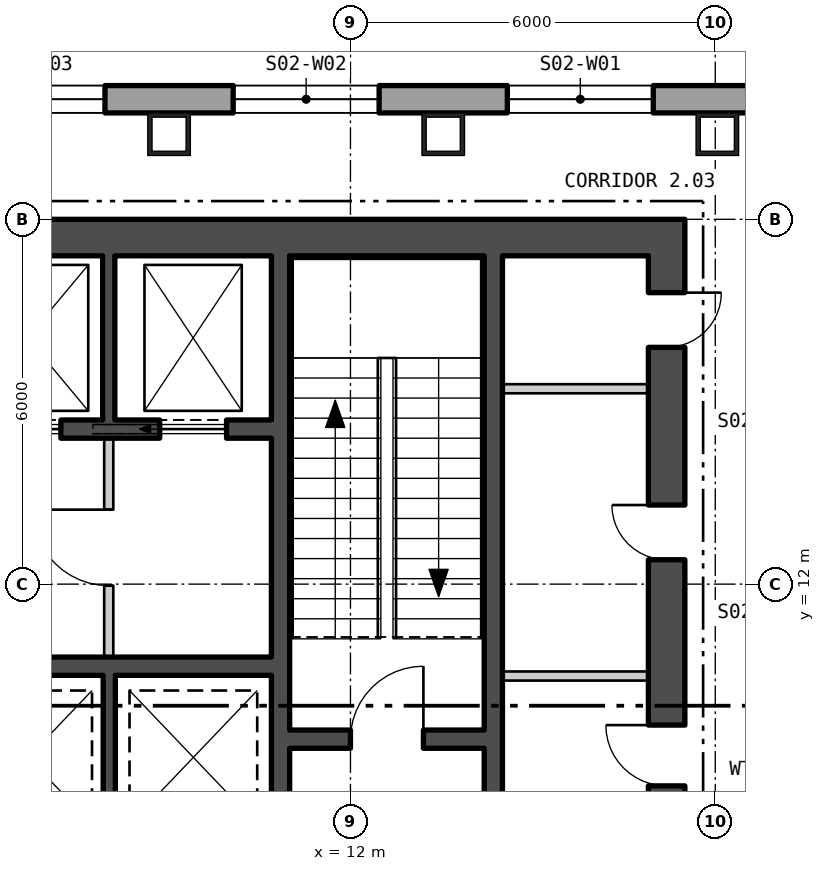
"""IFC4 building model, lengths in metres.
Left out: names, types, materials, properties, quantities, classifications, styles, units other than length and angle.
Written with IfcOpenShell. Run it as: python <this file> out.ifc"""

import sys

from ifc_helpers import new_model, si_unit, direction, frame, frame_2d, origin, origin_2d, place, context, subcontext, project, spatial, polyline, rectangle, hollow_rectangle, outline, extrude, element, fill, save


model = new_model("IFC4")
c1 = context("Model", 3, precision=1e-05, world=origin(), true_north=direction((0.0, 1.0)))
c2 = subcontext(c1, "Body", "Model", "MODEL_VIEW")
j1 = project(units=[si_unit("LENGTHUNIT", "METRE"), si_unit("PLANEANGLEUNIT", "RADIAN")], contexts=[c1])
p1 = place(None, origin())
s1 = spatial("IfcSite", under=j1, at=p1, CompositionType="ELEMENT")
p2 = place(p1, origin())
s2 = spatial("IfcBuilding", under=s1, at=p2, CompositionType="ELEMENT")
p3 = place(p2, frame((0.0, 0.0, 33.3)))
s3 = spatial("IfcBuildingStorey", under=s2, at=p3, CompositionType="ELEMENT", Elevation=33.3)
for number, where, z_axis, x_axis in (
    (1, (18.034, 19.4, 0.0), (0.0, 0.0, 1.0), (-1.0, 0.0, 0.0)),
    (2, (13.526, 19.4, 0.0), (0.0, 0.0, 1.0), (-1.0, 0.0, 0.0)),
    (3, (9.017, 19.4, 0.0), (0.0, 0.0, 1.0), (-1.0, 0.0, 0.0)),
):
    element("IfcColumn", number, at=place(p3, frame(where, z_axis=z_axis, x_axis=x_axis)), inside=s3, PredefinedType="COLUMN", context=c2, shape_type="SweptSolid", body=[
        extrude(hollow_rectangle(XDim=0.7, YDim=0.7, WallThickness=0.07, at=origin_2d()), origin(), (0.0, 0.0, 1.0), 4.5),
    ])
p4 = place(p3, frame((22.875, 19.975, -0.4), z_axis=(0.0, 0.0, 1.0), x_axis=(-1.0, 0.0, 0.0)))
e4 = element("IfcWall", 4, at=p4, inside=s3, PredefinedType="SOLIDWALL", context=c2, shape_type="SweptSolid", body=[
    extrude(outline(polyline([(-0.13, -0.225), (45.88, -0.225), (45.62, 0.225), (0.13, 0.225), (-0.13, -0.225)])), origin(), (0.0, 0.0, 1.0), 4.5),
])
p5 = place(p4, frame((5.895, 0.0, 1.3)))
e5 = element("IfcOpeningElement", 5, at=p5, cuts=e4, PredefinedType="OPENING", context=c2, shape_type="SweptSolid", body=[
    extrude(rectangle(XDim=2.4, YDim=2.6, at=frame_2d((1.2, 1.3))), frame((0.0, 0.235, 0.0), z_axis=(0.0, -1.0, 0.0), x_axis=(1.0, 0.0, 0.0)), (0.0, 0.0, 1.0), 0.47),
])
p6 = place(p4, frame((10.403, 0.0, 1.3)))
e6 = element("IfcOpeningElement", 6, at=p6, cuts=e4, PredefinedType="OPENING", context=c2, shape_type="SweptSolid", body=[
    extrude(rectangle(XDim=2.4, YDim=2.6, at=frame_2d((1.2, 1.3))), frame((0.0, 0.235, 0.0), z_axis=(0.0, -1.0, 0.0), x_axis=(1.0, 0.0, 0.0)), (0.0, 0.0, 1.0), 0.47),
])
p7 = place(p4, frame((14.912, 0.0, 1.3)))
e7 = element("IfcOpeningElement", 7, at=p7, cuts=e4, PredefinedType="OPENING", context=c2, shape_type="SweptSolid", body=[
    extrude(rectangle(XDim=2.4, YDim=2.6, at=frame_2d((1.2, 1.3))), frame((0.0, 0.235, 0.0), z_axis=(0.0, -1.0, 0.0), x_axis=(1.0, 0.0, 0.0)), (0.0, 0.0, 1.0), 0.47),
])
p8 = place(p4, frame((19.421, 0.0, 1.3)))
e8 = element("IfcOpeningElement", 8, at=p8, cuts=e4, PredefinedType="OPENING", context=c2, shape_type="SweptSolid", body=[
    extrude(rectangle(XDim=2.4, YDim=2.6, at=frame_2d((1.2, 1.3))), frame((0.0, 0.235, 0.0), z_axis=(0.0, -1.0, 0.0), x_axis=(1.0, 0.0, 0.0)), (0.0, 0.0, 1.0), 0.47),
])
p9 = place(p4, frame((23.929, 0.0, 1.3)))
e9 = element("IfcOpeningElement", 9, at=p9, cuts=e4, PredefinedType="OPENING", context=c2, shape_type="SweptSolid", body=[
    extrude(rectangle(XDim=2.4, YDim=2.6, at=frame_2d((1.2, 1.3))), frame((0.0, 0.235, 0.0), z_axis=(0.0, -1.0, 0.0), x_axis=(1.0, 0.0, 0.0)), (0.0, 0.0, 1.0), 0.47),
])
p10 = place(p4, frame((28.438, 0.0, 1.3)))
e10 = element("IfcOpeningElement", 10, at=p10, cuts=e4, PredefinedType="OPENING", context=c2, shape_type="SweptSolid", body=[
    extrude(rectangle(XDim=2.4, YDim=2.6, at=frame_2d((1.2, 1.3))), frame((0.0, 0.235, 0.0), z_axis=(0.0, -1.0, 0.0), x_axis=(1.0, 0.0, 0.0)), (0.0, 0.0, 1.0), 0.47),
])
p11 = place(p4, frame((32.947, 0.0, 1.3)))
e11 = element("IfcOpeningElement", 11, at=p11, cuts=e4, PredefinedType="OPENING", context=c2, shape_type="SweptSolid", body=[
    extrude(rectangle(XDim=2.4, YDim=2.6, at=frame_2d((1.2, 1.3))), frame((0.0, 0.235, 0.0), z_axis=(0.0, -1.0, 0.0), x_axis=(1.0, 0.0, 0.0)), (0.0, 0.0, 1.0), 0.47),
])
p12 = place(p4, frame((37.455, 0.0, 1.3)))
e12 = element("IfcOpeningElement", 12, at=p12, cuts=e4, PredefinedType="OPENING", context=c2, shape_type="SweptSolid", body=[
    extrude(rectangle(XDim=2.4, YDim=2.6, at=frame_2d((1.2, 1.3))), frame((0.0, 0.235, 0.0), z_axis=(0.0, -1.0, 0.0), x_axis=(1.0, 0.0, 0.0)), (0.0, 0.0, 1.0), 0.47),
])
p13 = place(p3, frame((5.75, -29.605, -0.18), z_axis=(0.0, 0.0, 1.0), x_axis=(0.500000335318, 0.866025210188, 0.0)))
e13 = element("IfcWall", 13, at=p13, inside=s3, PredefinedType="SOLIDWALL", context=c2, shape_type="SweptSolid", body=[
    extrude(outline(polyline([(-0.13, -0.225), (45.88, -0.225), (45.62, 0.225), (0.13, 0.225), (-0.13, -0.225)])), origin(), (0.0, 0.0, 1.0), 4.28),
])
p14 = place(p13, frame((1.425, 0.0, 1.08)))
e14 = element("IfcOpeningElement", 14, at=p14, cuts=e13, PredefinedType="OPENING", context=c2, shape_type="SweptSolid", body=[
    extrude(rectangle(XDim=2.4, YDim=2.6, at=frame_2d((1.2, 1.3))), frame((0.0, 0.235, 0.0), z_axis=(0.0, -1.0, 0.0), x_axis=(1.0, 0.0, 0.0)), (0.0, 0.0, 1.0), 0.47),
])
p15 = place(p13, frame((5.895, 0.0, 1.08)))
e15 = element("IfcOpeningElement", 15, at=p15, cuts=e13, PredefinedType="OPENING", context=c2, shape_type="SweptSolid", body=[
    extrude(rectangle(XDim=2.4, YDim=2.6, at=frame_2d((1.2, 1.3))), frame((0.0, 0.235, 0.0), z_axis=(0.0, -1.0, 0.0), x_axis=(1.0, 0.0, 0.0)), (0.0, 0.0, 1.0), 0.47),
])
p16 = place(p13, frame((10.403, 0.0, 1.08)))
e16 = element("IfcOpeningElement", 16, at=p16, cuts=e13, PredefinedType="OPENING", context=c2, shape_type="SweptSolid", body=[
    extrude(rectangle(XDim=2.4, YDim=2.6, at=frame_2d((1.2, 1.3))), frame((0.0, 0.235, 0.0), z_axis=(0.0, -1.0, 0.0), x_axis=(1.0, 0.0, 0.0)), (0.0, 0.0, 1.0), 0.47),
])
p17 = place(p13, frame((14.912, 0.0, 1.08)))
e17 = element("IfcOpeningElement", 17, at=p17, cuts=e13, PredefinedType="OPENING", context=c2, shape_type="SweptSolid", body=[
    extrude(rectangle(XDim=2.4, YDim=2.6, at=frame_2d((1.2, 1.3))), frame((0.0, 0.235, 0.0), z_axis=(0.0, -1.0, 0.0), x_axis=(1.0, 0.0, 0.0)), (0.0, 0.0, 1.0), 0.47),
])
p18 = place(p13, frame((19.421, 0.0, 1.08)))
e18 = element("IfcOpeningElement", 18, at=p18, cuts=e13, PredefinedType="OPENING", context=c2, shape_type="SweptSolid", body=[
    extrude(rectangle(XDim=2.4, YDim=2.6, at=frame_2d((1.2, 1.3))), frame((0.0, 0.235, 0.0), z_axis=(0.0, -1.0, 0.0), x_axis=(1.0, 0.0, 0.0)), (0.0, 0.0, 1.0), 0.47),
])
p19 = place(p13, frame((23.929, 0.0, 1.08)))
e19 = element("IfcOpeningElement", 19, at=p19, cuts=e13, PredefinedType="OPENING", context=c2, shape_type="SweptSolid", body=[
    extrude(rectangle(XDim=2.4, YDim=2.6, at=frame_2d((1.2, 1.3))), frame((0.0, 0.235, 0.0), z_axis=(0.0, -1.0, 0.0), x_axis=(1.0, 0.0, 0.0)), (0.0, 0.0, 1.0), 0.47),
])
p20 = place(p13, frame((28.438, 0.0, 1.08)))
e20 = element("IfcOpeningElement", 20, at=p20, cuts=e13, PredefinedType="OPENING", context=c2, shape_type="SweptSolid", body=[
    extrude(rectangle(XDim=2.4, YDim=2.6, at=frame_2d((1.2, 1.3))), frame((0.0, 0.235, 0.0), z_axis=(0.0, -1.0, 0.0), x_axis=(1.0, 0.0, 0.0)), (0.0, 0.0, 1.0), 0.47),
])
p21 = place(p13, frame((32.947, 0.0, 1.08)))
e21 = element("IfcOpeningElement", 21, at=p21, cuts=e13, PredefinedType="OPENING", context=c2, shape_type="SweptSolid", body=[
    extrude(rectangle(XDim=2.4, YDim=2.6, at=frame_2d((1.2, 1.3))), frame((0.0, 0.235, 0.0), z_axis=(0.0, -1.0, 0.0), x_axis=(1.0, 0.0, 0.0)), (0.0, 0.0, 1.0), 0.47),
])
p22 = place(p13, frame((37.455, 0.0, 1.08)))
e22 = element("IfcOpeningElement", 22, at=p22, cuts=e13, PredefinedType="OPENING", context=c2, shape_type="SweptSolid", body=[
    extrude(rectangle(XDim=2.4, YDim=2.6, at=frame_2d((1.2, 1.3))), frame((0.0, 0.235, 0.0), z_axis=(0.0, -1.0, 0.0), x_axis=(1.0, 0.0, 0.0)), (0.0, 0.0, 1.0), 0.47),
])
p23 = place(p13, frame((41.925, 0.0, 1.08)))
e23 = element("IfcOpeningElement", 23, at=p23, cuts=e13, PredefinedType="OPENING", context=c2, shape_type="SweptSolid", body=[
    extrude(rectangle(XDim=2.4, YDim=2.6, at=frame_2d((1.2, 1.3))), frame((0.0, 0.235, 0.0), z_axis=(0.0, -1.0, 0.0), x_axis=(1.0, 0.0, 0.0)), (0.0, 0.0, 1.0), 0.47),
])
p24 = place(p3, frame((-17.5, 17.7, 0.0), z_axis=(0.0, 0.0, 1.0), x_axis=(1.0, 0.0, 0.0)))
e24 = element("IfcWall", 24, at=p24, inside=s3, PredefinedType="SHEAR", context=c2, shape_type="SweptSolid", body=[
    extrude(rectangle(XDim=35.0, YDim=0.6, at=frame_2d((17.5, 0.0))), origin(), (0.0, 0.0, 1.0), 4.3),
])
p25 = place(p3, frame((17.2, 0.6, 0.0), z_axis=(0.0, 0.0, 1.0), x_axis=(0.0, 1.0, 0.0)))
e25 = element("IfcWall", 25, at=p25, inside=s3, PredefinedType="SHEAR", context=c2, shape_type="SweptSolid", body=[
    extrude(rectangle(XDim=16.8, YDim=0.6, at=frame_2d((8.4, 0.0))), origin(), (0.0, 0.0, 1.0), 4.3),
])
p26 = place(p25, frame((5.7, 0.0, 0.0)))
e26 = element("IfcOpeningElement", 26, at=p26, cuts=e25, PredefinedType="OPENING", context=c2, shape_type="SweptSolid", body=[
    extrude(rectangle(XDim=1.5, YDim=2.1, at=frame_2d((0.75, 1.05))), frame((0.0, 0.31, 0.0), z_axis=(0.0, -1.0, 0.0), x_axis=(1.0, 0.0, 0.0)), (0.0, 0.0, 1.0), 0.62),
])
p27 = place(p25, frame((0.4, 0.0, 0.0)))
e27 = element("IfcOpeningElement", 27, at=p27, cuts=e25, PredefinedType="OPENING", context=c2, shape_type="SweptSolid", body=[
    extrude(rectangle(XDim=0.9, YDim=2.1, at=frame_2d((0.45, 1.05))), frame((0.0, 0.31, 0.0), z_axis=(0.0, -1.0, 0.0), x_axis=(1.0, 0.0, 0.0)), (0.0, 0.0, 1.0), 0.62),
])
p28 = place(p25, frame((3.15, 0.0, 0.0)))
e28 = element("IfcOpeningElement", 28, at=p28, cuts=e25, PredefinedType="OPENING", context=c2, shape_type="SweptSolid", body=[
    extrude(rectangle(XDim=0.9, YDim=2.1, at=frame_2d((0.45, 1.05))), frame((0.0, 0.31, 0.0), z_axis=(0.0, -1.0, 0.0), x_axis=(1.0, 0.0, 0.0)), (0.0, 0.0, 1.0), 0.62),
])
p29 = place(p25, frame((8.082, 0.0, 0.0)))
e29 = element("IfcOpeningElement", 29, at=p29, cuts=e25, PredefinedType="OPENING", context=c2, shape_type="SweptSolid", body=[
    extrude(rectangle(XDim=1.0, YDim=2.1, at=frame_2d((0.5, 1.05))), frame((0.0, 0.31, 0.0), z_axis=(0.0, -1.0, 0.0), x_axis=(1.0, 0.0, 0.0)), (0.0, 0.0, 1.0), 0.62),
])
p30 = place(p25, frame((11.801, 0.0, 0.0)))
e30 = element("IfcOpeningElement", 30, at=p30, cuts=e25, PredefinedType="OPENING", context=c2, shape_type="SweptSolid", body=[
    extrude(rectangle(XDim=0.9, YDim=2.1, at=frame_2d((0.45, 1.05))), frame((0.0, 0.31, 0.0), z_axis=(0.0, -1.0, 0.0), x_axis=(1.0, 0.0, 0.0)), (0.0, 0.0, 1.0), 0.62),
])
p31 = place(p25, frame((15.294, 0.0, 0.0)))
e31 = element("IfcOpeningElement", 31, at=p31, cuts=e25, PredefinedType="OPENING", context=c2, shape_type="SweptSolid", body=[
    extrude(rectangle(XDim=0.9, YDim=2.1, at=frame_2d((0.45, 1.05))), frame((0.0, 0.31, 0.0), z_axis=(0.0, -1.0, 0.0), x_axis=(1.0, 0.0, 0.0)), (0.0, 0.0, 1.0), 0.62),
])
p32 = place(p3, frame((10.85, 0.6, 0.0), z_axis=(0.0, 0.0, 1.0), x_axis=(0.0, 1.0, 0.0)))
e32 = element("IfcWall", 32, at=p32, inside=s3, PredefinedType="SHEAR", context=c2, shape_type="SweptSolid", body=[
    extrude(rectangle(XDim=16.8, YDim=0.3, at=frame_2d((8.4, 0.0))), origin(), (0.0, 0.0, 1.0), 4.3),
])
p33 = place(p32, frame((5.075, 0.0, 0.0)))
e33 = element("IfcOpeningElement", 33, at=p33, cuts=e32, PredefinedType="OPENING", context=c2, shape_type="SweptSolid", body=[
    extrude(rectangle(XDim=1.25, YDim=2.1, at=frame_2d((0.625, 1.05))), frame((0.0, 0.16, 0.0), z_axis=(0.0, -1.0, 0.0), x_axis=(1.0, 0.0, 0.0)), (0.0, 0.0, 1.0), 0.32),
])
p34 = place(p32, frame((1.525, 0.0, 0.0)))
e34 = element("IfcOpeningElement", 34, at=p34, cuts=e32, PredefinedType="OPENING", context=c2, shape_type="SweptSolid", body=[
    extrude(rectangle(XDim=1.0, YDim=2.1, at=frame_2d((0.5, 1.05))), frame((0.0, 0.16, 0.0), z_axis=(0.0, -1.0, 0.0), x_axis=(1.0, 0.0, 0.0)), (0.0, 0.0, 1.0), 0.32),
])
p35 = place(p3, frame((14.35, 0.6, 0.0), z_axis=(0.0, 0.0, 1.0), x_axis=(0.0, 1.0, 0.0)))
e35 = element("IfcWall", 35, at=p35, inside=s3, PredefinedType="SHEAR", context=c2, shape_type="SweptSolid", body=[
    extrude(rectangle(XDim=16.8, YDim=0.3, at=frame_2d((8.4, 0.0))), origin(), (0.0, 0.0, 1.0), 4.3),
])
p36 = place(p35, frame((5.7, 0.0, 0.0)))
e36 = element("IfcOpeningElement", 36, at=p36, cuts=e35, PredefinedType="OPENING", context=c2, shape_type="SweptSolid", body=[
    extrude(rectangle(XDim=1.5, YDim=2.1, at=frame_2d((0.75, 1.05))), frame((0.0, 0.16, 0.0), z_axis=(0.0, -1.0, 0.0), x_axis=(1.0, 0.0, 0.0)), (0.0, 0.0, 1.0), 0.32),
])
p37 = place(p3, frame((11.0, 9.45, 0.0), z_axis=(0.0, 0.0, 1.0), x_axis=(1.0, 0.0, 0.0)))
e37 = element("IfcWall", 37, at=p37, inside=s3, PredefinedType="SHEAR", context=c2, shape_type="SweptSolid", body=[
    extrude(rectangle(XDim=3.2, YDim=0.3, at=frame_2d((1.6, 0.0))), origin(), (0.0, 0.0, 1.0), 4.3),
])
p38 = place(p37, frame((1.0, 0.0, 0.0)))
e38 = element("IfcOpeningElement", 38, at=p38, cuts=e37, PredefinedType="OPENING", context=c2, shape_type="SweptSolid", body=[
    extrude(rectangle(XDim=1.2, YDim=2.1, at=frame_2d((0.6, 1.05))), frame((0.0, 0.16, 0.0), z_axis=(0.0, -1.0, 0.0), x_axis=(1.0, 0.0, 0.0)), (0.0, 0.0, 1.0), 0.32),
])
p39 = place(p3, frame((-10.7, 14.55, 0.0), z_axis=(0.0, 0.0, 1.0), x_axis=(1.0, 0.0, 0.0)))
e39 = element("IfcWall", 39, at=p39, inside=s3, PredefinedType="SHEAR", context=c2, shape_type="SweptSolid", body=[
    extrude(rectangle(XDim=21.4, YDim=0.3, at=frame_2d((10.7, 0.0))), origin(), (0.0, 0.0, 1.0), 4.3),
])
p40 = place(p39, frame((0.738, 0.0, 0.0)))
e40 = element("IfcOpeningElement", 40, at=p40, cuts=e39, PredefinedType="OPENING", context=c2, shape_type="SweptSolid", body=[
    extrude(rectangle(XDim=1.1, YDim=2.1, at=frame_2d((0.55, 1.05))), frame((0.0, 0.16, 0.0), z_axis=(0.0, -1.0, 0.0), x_axis=(1.0, 0.0, 0.0)), (0.0, 0.0, 1.0), 0.32),
])
p41 = place(p39, frame((3.462, 0.0, 0.0)))
e41 = element("IfcOpeningElement", 41, at=p41, cuts=e39, PredefinedType="OPENING", context=c2, shape_type="SweptSolid", body=[
    extrude(rectangle(XDim=1.1, YDim=2.1, at=frame_2d((0.55, 1.05))), frame((0.0, 0.16, 0.0), z_axis=(0.0, -1.0, 0.0), x_axis=(1.0, 0.0, 0.0)), (0.0, 0.0, 1.0), 0.32),
])
p42 = place(p39, frame((6.138, 0.0, 0.0)))
e42 = element("IfcOpeningElement", 42, at=p42, cuts=e39, PredefinedType="OPENING", context=c2, shape_type="SweptSolid", body=[
    extrude(rectangle(XDim=1.1, YDim=2.1, at=frame_2d((0.55, 1.05))), frame((0.0, 0.16, 0.0), z_axis=(0.0, -1.0, 0.0), x_axis=(1.0, 0.0, 0.0)), (0.0, 0.0, 1.0), 0.32),
])
p43 = place(p39, frame((8.812, 0.0, 0.0)))
e43 = element("IfcOpeningElement", 43, at=p43, cuts=e39, PredefinedType="OPENING", context=c2, shape_type="SweptSolid", body=[
    extrude(rectangle(XDim=1.1, YDim=2.1, at=frame_2d((0.55, 1.05))), frame((0.0, 0.16, 0.0), z_axis=(0.0, -1.0, 0.0), x_axis=(1.0, 0.0, 0.0)), (0.0, 0.0, 1.0), 0.32),
])
p44 = place(p39, frame((14.162, 0.0, 0.0)))
e44 = element("IfcOpeningElement", 44, at=p44, cuts=e39, PredefinedType="OPENING", context=c2, shape_type="SweptSolid", body=[
    extrude(rectangle(XDim=1.1, YDim=2.1, at=frame_2d((0.55, 1.05))), frame((0.0, 0.16, 0.0), z_axis=(0.0, -1.0, 0.0), x_axis=(1.0, 0.0, 0.0)), (0.0, 0.0, 1.0), 0.32),
])
p45 = place(p39, frame((16.837, 0.0, 0.0)))
e45 = element("IfcOpeningElement", 45, at=p45, cuts=e39, PredefinedType="OPENING", context=c2, shape_type="SweptSolid", body=[
    extrude(rectangle(XDim=1.1, YDim=2.1, at=frame_2d((0.55, 1.05))), frame((0.0, 0.16, 0.0), z_axis=(0.0, -1.0, 0.0), x_axis=(1.0, 0.0, 0.0)), (0.0, 0.0, 1.0), 0.32),
])
p46 = place(p39, frame((19.562, 0.0, 0.0)))
e46 = element("IfcOpeningElement", 46, at=p46, cuts=e39, PredefinedType="OPENING", context=c2, shape_type="SweptSolid", body=[
    extrude(rectangle(XDim=1.1, YDim=2.1, at=frame_2d((0.55, 1.05))), frame((0.0, 0.16, 0.0), z_axis=(0.0, -1.0, 0.0), x_axis=(1.0, 0.0, 0.0)), (0.0, 0.0, 1.0), 0.32),
])
p47 = place(p3, frame((2.6, 10.65, 0.0), z_axis=(0.0, 0.0, 1.0), x_axis=(1.0, 0.0, 0.0)))
e47 = element("IfcWall", 47, at=p47, inside=s3, PredefinedType="SHEAR", context=c2, shape_type="SweptSolid", body=[
    extrude(rectangle(XDim=8.1, YDim=0.3, at=frame_2d((4.05, 0.0))), origin(), (0.0, 0.0, 1.0), 4.3),
])
for number, where, z_axis, x_axis in (
    (48, (8.025, 14.7, 0.0), (0.0, 0.0, 1.0), (0.0, 1.0, 0.0)),
    (49, (8.033, 7.8, 0.0), (0.0, 0.0, 1.0), (0.0, 1.0, 0.0)),
):
    element("IfcWall", number, at=place(p3, frame(where, z_axis=z_axis, x_axis=x_axis)), inside=s3, PredefinedType="SHEAR", context=c2, shape_type="SweptSolid", body=[
        extrude(rectangle(XDim=2.7, YDim=0.2, at=frame_2d((1.35, 0.0))), origin(), (0.0, 0.0, 1.0), 4.3),
    ])
p48 = place(p3, frame((8.025, 10.8, 0.0), z_axis=(0.0, 0.0, 1.0), x_axis=(0.0, 1.0, 0.0)))
e50 = element("IfcWall", 50, at=p48, inside=s3, PredefinedType="PARTITIONING", context=c2, shape_type="SweptSolid", body=[
    extrude(rectangle(XDim=3.6, YDim=0.15, at=frame_2d((1.8, 0.0))), origin(), (0.0, 0.0, 1.0), 4.3),
])
p49 = place(p48, frame((1.175, 0.0, 0.0)))
e51 = element("IfcOpeningElement", 51, at=p49, cuts=e50, PredefinedType="OPENING", context=c2, shape_type="SweptSolid", body=[
    extrude(rectangle(XDim=1.25, YDim=2.1, at=frame_2d((0.625, 1.05))), frame((0.0, 0.085, 0.0), z_axis=(0.0, -1.0, 0.0), x_axis=(1.0, 0.0, 0.0)), (0.0, 0.0, 1.0), 0.17),
])
for number, where, z_axis, x_axis in (
    (52, (14.5, 10.489, 0.0), (0.0, 0.0, 1.0), (1.0, 0.0, 0.0)),
    (53, (14.5, 15.213, 0.0), (0.0, 0.0, 1.0), (1.0, 0.0, 0.0)),
):
    element("IfcWall", number, at=place(p3, frame(where, z_axis=z_axis, x_axis=x_axis)), inside=s3, PredefinedType="PARTITIONING", context=c2, shape_type="SweptSolid", body=[
        extrude(rectangle(XDim=2.4, YDim=0.15, at=frame_2d((1.2, 0.0))), origin(), (0.0, 0.0, 1.0), 4.3),
    ])
p50 = place(p5, origin())
e54 = element("IfcWindow", 54, at=p50, inside=s3, PartitioningType="SINGLE_PANEL", PredefinedType="WINDOW", context=c2, shape_type="SweptSolid", body=[
    extrude(rectangle(XDim=2.4, YDim=2.6, at=frame_2d((1.2, 1.3))), frame((0.0, 0.105, 0.0), z_axis=(0.0, -1.0, 0.0), x_axis=(1.0, 0.0, 0.0)), (0.0, 0.0, 1.0), 0.06),
])
fill(e5, e54)
p51 = place(p6, origin())
e55 = element("IfcWindow", 55, at=p51, inside=s3, PartitioningType="SINGLE_PANEL", PredefinedType="WINDOW", context=c2, shape_type="SweptSolid", body=[
    extrude(rectangle(XDim=2.4, YDim=2.6, at=frame_2d((1.2, 1.3))), frame((0.0, 0.105, 0.0), z_axis=(0.0, -1.0, 0.0), x_axis=(1.0, 0.0, 0.0)), (0.0, 0.0, 1.0), 0.06),
])
fill(e6, e55)
p52 = place(p7, origin())
e56 = element("IfcWindow", 56, at=p52, inside=s3, PartitioningType="SINGLE_PANEL", PredefinedType="WINDOW", context=c2, shape_type="SweptSolid", body=[
    extrude(rectangle(XDim=2.4, YDim=2.6, at=frame_2d((1.2, 1.3))), frame((0.0, 0.105, 0.0), z_axis=(0.0, -1.0, 0.0), x_axis=(1.0, 0.0, 0.0)), (0.0, 0.0, 1.0), 0.06),
])
fill(e7, e56)
p53 = place(p45, origin())
e57 = element("IfcDoor", 57, at=p53, inside=s3, OperationType="SLIDING_TO_LEFT", PredefinedType="DOOR", context=c2, shape_type="SweptSolid", body=[
    extrude(rectangle(XDim=1.1, YDim=2.1, at=frame_2d((0.55, 1.05))), frame((0.0, 0.025, 0.0), z_axis=(0.0, -1.0, 0.0), x_axis=(1.0, 0.0, 0.0)), (0.0, 0.0, 1.0), 0.05),
])
fill(e45, e57)
p54 = place(p46, origin())
e58 = element("IfcDoor", 58, at=p54, inside=s3, OperationType="SLIDING_TO_LEFT", PredefinedType="DOOR", context=c2, shape_type="SweptSolid", body=[
    extrude(rectangle(XDim=1.1, YDim=2.1, at=frame_2d((0.55, 1.05))), frame((0.0, 0.025, 0.0), z_axis=(0.0, -1.0, 0.0), x_axis=(1.0, 0.0, 0.0)), (0.0, 0.0, 1.0), 0.05),
])
fill(e46, e58)
p55 = place(p49, origin())
e59 = element("IfcDoor", 59, at=p55, inside=s3, OperationType="SINGLE_SWING_LEFT", PredefinedType="DOOR", context=c2, shape_type="SweptSolid", body=[
    extrude(rectangle(XDim=1.25, YDim=2.1, at=frame_2d((0.625, 1.05))), frame((0.0, 0.025, 0.0), z_axis=(0.0, -1.0, 0.0), x_axis=(1.0, 0.0, 0.0)), (0.0, 0.0, 1.0), 0.05),
])
fill(e51, e59)
p56 = place(p38, origin())
e60 = element("IfcDoor", 60, at=p56, inside=s3, OperationType="SINGLE_SWING_LEFT", PredefinedType="DOOR", context=c2, shape_type="SweptSolid", body=[
    extrude(rectangle(XDim=1.2, YDim=2.1, at=frame_2d((0.6, 1.05))), frame((0.0, 0.025, 0.0), z_axis=(0.0, -1.0, 0.0), x_axis=(1.0, 0.0, 0.0)), (0.0, 0.0, 1.0), 0.05),
])
fill(e38, e60)
p57 = place(p29, origin())
e61 = element("IfcDoor", 61, at=p57, inside=s3, OperationType="SINGLE_SWING_LEFT", PredefinedType="DOOR", context=c2, shape_type="SweptSolid", body=[
    extrude(rectangle(XDim=1.0, YDim=2.1, at=frame_2d((0.5, 1.05))), frame((0.0, 0.025, 0.0), z_axis=(0.0, -1.0, 0.0), x_axis=(1.0, 0.0, 0.0)), (0.0, 0.0, 1.0), 0.05),
])
fill(e29, e61)
p58 = place(p30, origin())
e62 = element("IfcDoor", 62, at=p58, inside=s3, OperationType="SINGLE_SWING_LEFT", PredefinedType="DOOR", context=c2, shape_type="SweptSolid", body=[
    extrude(rectangle(XDim=0.9, YDim=2.1, at=frame_2d((0.45, 1.05))), frame((0.0, 0.025, 0.0), z_axis=(0.0, -1.0, 0.0), x_axis=(1.0, 0.0, 0.0)), (0.0, 0.0, 1.0), 0.05),
])
fill(e30, e62)
p59 = place(p31, origin())
e63 = element("IfcDoor", 63, at=p59, inside=s3, OperationType="SINGLE_SWING_RIGHT", PredefinedType="DOOR", context=c2, shape_type="SweptSolid", body=[
    extrude(rectangle(XDim=0.9, YDim=2.1, at=frame_2d((0.45, 1.05))), frame((0.0, 0.025, 0.0), z_axis=(0.0, -1.0, 0.0), x_axis=(1.0, 0.0, 0.0)), (0.0, 0.0, 1.0), 0.05),
])
fill(e31, e63)
save(model, sys.argv[1])
